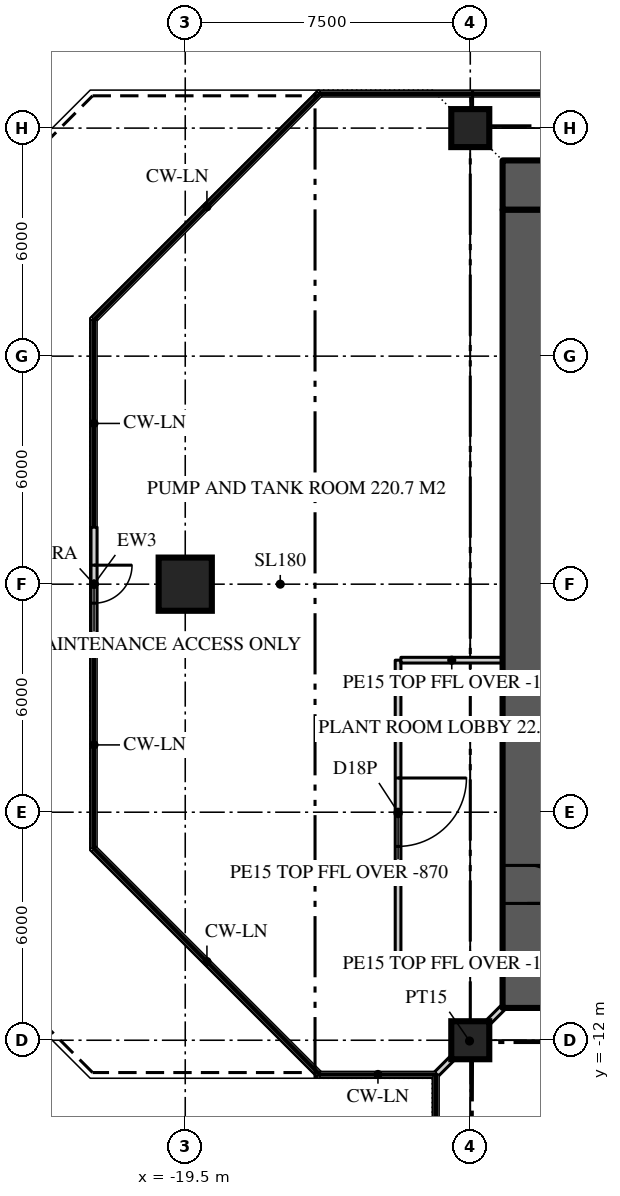
"""IFC4 building model, lengths in metres.
Left out: names, types, materials, properties, quantities, classifications, styles, units other than length and angle.
Written with IfcOpenShell. Run it as: python <this file> out.ifc"""

import sys

from ifc_helpers import new_model, si_unit, direction, frame, frame_2d, origin, origin_2d, place, context, subcontext, project, spatial, rectangle, extrude, element, fill, save


model = new_model("IFC4")
c1 = context("Model", 3, precision=1e-05, world=origin(), true_north=direction((0.0, 1.0)))
c2 = subcontext(c1, "Body", "Model", "MODEL_VIEW")
j1 = project(units=[si_unit("LENGTHUNIT", "METRE"), si_unit("PLANEANGLEUNIT", "RADIAN")], contexts=[c1])
p1 = place(None, origin())
s1 = spatial("IfcSite", under=j1, at=p1, CompositionType="ELEMENT")
p2 = place(p1, origin())
s2 = spatial("IfcBuilding", under=s1, at=p2, CompositionType="ELEMENT")
p3 = place(p2, frame((0.0, 0.0, 306.3)))
s3 = spatial("IfcBuildingStorey", under=s2, at=p3, CompositionType="ELEMENT", Elevation=306.3)
p4 = place(p3, frame((-11.15, 10.5, 0.0), z_axis=(0.0, 0.0, 1.0), x_axis=(1.0, 0.0, 0.0)))
e1 = element("IfcWall", 1, at=p4, inside=s3, PredefinedType="SHEAR", context=c2, shape_type="SweptSolid", body=[
    extrude(rectangle(XDim=22.3, YDim=1.3, at=frame_2d((11.15, 0.0))), origin(), (0.0, 0.0, 1.0), 5.0),
])
p5 = place(p4, frame((4.25, 0.0, 0.0)))
e2 = element("IfcOpeningElement", 2, at=p5, cuts=e1, PredefinedType="OPENING", context=c2, shape_type="SweptSolid", body=[
    extrude(rectangle(XDim=1.8, YDim=2.2, at=frame_2d((0.9, 1.1))), frame((0.0, 0.66, 0.0), z_axis=(0.0, -1.0, 0.0), x_axis=(1.0, 0.0, 0.0)), (0.0, 0.0, 1.0), 1.32),
])
p6 = place(p4, frame((16.25, 0.0, 0.0)))
e3 = element("IfcOpeningElement", 3, at=p6, cuts=e1, PredefinedType="OPENING", context=c2, shape_type="SweptSolid", body=[
    extrude(rectangle(XDim=1.8, YDim=2.2, at=frame_2d((0.9, 1.1))), frame((0.0, 0.66, 0.0), z_axis=(0.0, -1.0, 0.0), x_axis=(1.0, 0.0, 0.0)), (0.0, 0.0, 1.0), 1.32),
])
p7 = place(p3, frame((11.15, -10.5, 0.0), z_axis=(0.0, 0.0, 1.0), x_axis=(-1.0, 0.0, 0.0)))
e4 = element("IfcWall", 4, at=p7, inside=s3, PredefinedType="SHEAR", context=c2, shape_type="SweptSolid", body=[
    extrude(rectangle(XDim=22.3, YDim=1.3, at=frame_2d((11.15, 0.0))), origin(), (0.0, 0.0, 1.0), 5.0),
])
p8 = place(p7, frame((16.25, 0.0, 0.0)))
e5 = element("IfcOpeningElement", 5, at=p8, cuts=e4, PredefinedType="OPENING", context=c2, shape_type="SweptSolid", body=[
    extrude(rectangle(XDim=1.8, YDim=2.2, at=frame_2d((0.9, 1.1))), frame((0.0, 0.66, 0.0), z_axis=(0.0, -1.0, 0.0), x_axis=(1.0, 0.0, 0.0)), (0.0, 0.0, 1.0), 1.32),
])
p9 = place(p7, frame((4.25, 0.0, 0.0)))
e6 = element("IfcOpeningElement", 6, at=p9, cuts=e4, PredefinedType="OPENING", context=c2, shape_type="SweptSolid", body=[
    extrude(rectangle(XDim=1.8, YDim=2.2, at=frame_2d((0.9, 1.1))), frame((0.0, 0.66, 0.0), z_axis=(0.0, -1.0, 0.0), x_axis=(1.0, 0.0, 0.0)), (0.0, 0.0, 1.0), 1.32),
])
p10 = place(p3, frame((-10.5, 9.85, 0.0), z_axis=(0.0, 0.0, 1.0), x_axis=(0.0, -1.0, 0.0)))
e7 = element("IfcWall", 7, at=p10, inside=s3, PredefinedType="SHEAR", context=c2, shape_type="SweptSolid", body=[
    extrude(rectangle(XDim=19.7, YDim=1.3, at=frame_2d((9.85, 0.0))), origin(), (0.0, 0.0, 1.0), 5.0),
])
p11 = place(p10, frame((17.25, 0.0, 0.0)))
e8 = element("IfcOpeningElement", 8, at=p11, cuts=e7, PredefinedType="OPENING", context=c2, shape_type="SweptSolid", body=[
    extrude(rectangle(XDim=1.0, YDim=2.2, at=frame_2d((0.5, 1.1))), frame((0.0, 0.66, 0.0), z_axis=(0.0, -1.0, 0.0), x_axis=(1.0, 0.0, 0.0)), (0.0, 0.0, 1.0), 1.32),
])
p12 = place(p3, frame((-12.0, -12.0, 0.0), z_axis=(0.0, 0.0, 1.0), x_axis=(1.0, 0.0, 0.0)))
e9 = element("IfcColumn", 9, at=p12, inside=s3, PredefinedType="COLUMN", context=c2, shape_type="SweptSolid", body=[
    extrude(rectangle(XDim=1.0, YDim=1.0, at=origin_2d()), origin(), (0.0, 0.0, 1.0), 5.0),
])
p13 = place(p3, frame((-19.5, 0.0, 0.0), z_axis=(0.0, 0.0, 1.0), x_axis=(1.0, 0.0, 0.0)))
e10 = element("IfcColumn", 10, at=p13, inside=s3, PredefinedType="COLUMN", context=c2, shape_type="SweptSolid", body=[
    extrude(rectangle(XDim=1.4, YDim=1.4, at=origin_2d()), origin(), (0.0, 0.0, 1.0), 5.0),
])
p14 = place(p3, frame((-12.0, 12.0, 0.0), z_axis=(0.0, 0.0, 1.0), x_axis=(1.0, 0.0, 0.0)))
e11 = element("IfcColumn", 11, at=p14, inside=s3, PredefinedType="COLUMN", context=c2, shape_type="SweptSolid", body=[
    extrude(rectangle(XDim=1.0, YDim=1.0, at=origin_2d()), origin(), (0.0, 0.0, 1.0), 5.0),
])
p15 = place(p3, frame((-21.9, 1.5, 0.0), z_axis=(0.0, 0.0, 1.0), x_axis=(0.0, -1.0, 0.0)))
e12 = element("IfcWall", 12, at=p15, inside=s3, PredefinedType="SOLIDWALL", context=c2, shape_type="SweptSolid", body=[
    extrude(rectangle(XDim=3.0, YDim=0.16, at=frame_2d((1.5, 0.0))), origin(), (0.0, 0.0, 1.0), 4.82),
])
p16 = place(p15, frame((1.0, 0.0, 0.0)))
e13 = element("IfcOpeningElement", 13, at=p16, cuts=e12, PredefinedType="OPENING", context=c2, shape_type="SweptSolid", body=[
    extrude(rectangle(XDim=1.0, YDim=2.2, at=frame_2d((0.5, 1.1))), frame((0.0, 0.09, 0.0), z_axis=(0.0, -1.0, 0.0), x_axis=(1.0, 0.0, 0.0)), (0.0, 0.0, 1.0), 0.18),
])
p17 = place(p3, frame((-13.9, -2.0, 0.0), z_axis=(0.0, 0.0, 1.0), x_axis=(0.0, -1.0, 0.0)))
e14 = element("IfcWall", 14, at=p17, inside=s3, PredefinedType="SOLIDWALL", context=c2, shape_type="SweptSolid", body=[
    extrude(rectangle(XDim=8.075, YDim=0.15, at=frame_2d((4.038, 0.0))), origin(), (0.0, 0.0, 1.0), 4.13),
])
p18 = place(p17, frame((3.1, 0.0, 0.0)))
e15 = element("IfcOpeningElement", 15, at=p18, cuts=e14, PredefinedType="OPENING", context=c2, shape_type="SweptSolid", body=[
    extrude(rectangle(XDim=1.8, YDim=2.4, at=frame_2d((0.9, 1.2))), frame((0.0, 0.085, 0.0), z_axis=(0.0, -1.0, 0.0), x_axis=(1.0, 0.0, 0.0)), (0.0, 0.0, 1.0), 0.17),
])
for number, where, z_axis, x_axis in (
    (16, (-11.15, -10.0, 0.0), (0.0, 0.0, 1.0), (-1.0, 0.0, 0.0)),
    (17, (-11.15, -2.0, 0.0), (0.0, 0.0, 1.0), (-1.0, 0.0, 0.0)),
):
    element("IfcWall", number, at=place(p3, frame(where, z_axis=z_axis, x_axis=x_axis)), inside=s3, PredefinedType="SOLIDWALL", context=c2, shape_type="SweptSolid", body=[
        extrude(rectangle(XDim=2.675, YDim=0.15, at=frame_2d((1.337, 0.0))), origin(), (0.0, 0.0, 1.0), 4.82),
    ])
p19 = place(p3, frame((-11.15, -11.15, 0.0), z_axis=(0.0, 0.0, 1.0), x_axis=(-0.707106781187, -0.707106781187, 0.0)))
e18 = element("IfcWall", 18, at=p19, inside=s3, PredefinedType="PARTITIONING", context=c2, shape_type="SweptSolid", body=[
    extrude(rectangle(XDim=2.461, YDim=0.15, at=frame_2d((1.23, 0.0))), origin(), (0.0, 0.0, 1.0), 4.82),
])
p20 = place(p16, origin())
e19 = element("IfcDoor", 19, at=p20, inside=s3, OperationType="SINGLE_SWING_LEFT", PredefinedType="DOOR", context=c2, shape_type="SweptSolid", body=[
    extrude(rectangle(XDim=1.0, YDim=2.2, at=frame_2d((0.5, 1.1))), frame((0.0, 0.025, 0.0), z_axis=(0.0, -1.0, 0.0), x_axis=(1.0, 0.0, 0.0)), (0.0, 0.0, 1.0), 0.05),
])
fill(e13, e19)
p21 = place(p11, origin())
e20 = element("IfcDoor", 20, at=p21, inside=s3, OperationType="SINGLE_SWING_RIGHT", PredefinedType="DOOR", context=c2, shape_type="SweptSolid", body=[
    extrude(rectangle(XDim=1.0, YDim=2.2, at=frame_2d((0.5, 1.1))), frame((0.0, 0.025, 0.0), z_axis=(0.0, -1.0, 0.0), x_axis=(1.0, 0.0, 0.0)), (0.0, 0.0, 1.0), 0.05),
])
fill(e8, e20)
p22 = place(p18, origin())
e21 = element("IfcDoor", 21, at=p22, inside=s3, OperationType="DOUBLE_DOOR_DOUBLE_SWING", PredefinedType="DOOR", context=c2, shape_type="SweptSolid", body=[
    extrude(rectangle(XDim=1.8, YDim=2.4, at=frame_2d((0.9, 1.2))), frame((0.0, 0.025, 0.0), z_axis=(0.0, -1.0, 0.0), x_axis=(1.0, 0.0, 0.0)), (0.0, 0.0, 1.0), 0.05),
])
fill(e15, e21)
save(model, sys.argv[1])
